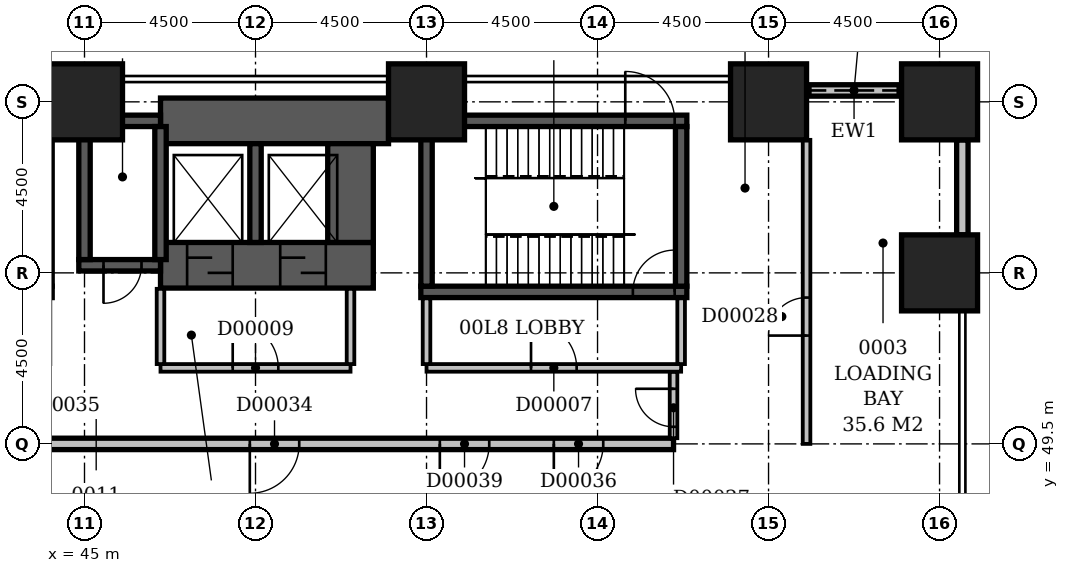
"""IFC4 building model, lengths in metres.
Left out: names, types, materials, properties, quantities, classifications, styles, units other than length and angle.
Written with IfcOpenShell. Run it as: python <this file> out.ifc"""

import sys

from ifc_helpers import new_model, si_unit, direction, frame, frame_2d, origin, origin_2d, place, context, subcontext, project, spatial, rectangle, extrude, element, fill, save


model = new_model("IFC4")
c1 = context("Model", 3, precision=1e-05, world=origin(), true_north=direction((0.0, 1.0)))
c2 = subcontext(c1, "Body", "Model", "MODEL_VIEW")
j1 = project(units=[si_unit("LENGTHUNIT", "METRE"), si_unit("PLANEANGLEUNIT", "RADIAN")], contexts=[c1])
p1 = place(None, origin())
s1 = spatial("IfcSite", under=j1, at=p1, CompositionType="ELEMENT")
p2 = place(p1, origin())
s2 = spatial("IfcBuilding", under=s1, at=p2, CompositionType="ELEMENT")
p3 = place(p2, origin())
s3 = spatial("IfcBuildingStorey", under=s2, at=p3, CompositionType="ELEMENT", Elevation=0.0)
p4 = place(p3, frame((44.0, 53.65, -0.45), z_axis=(0.0, 0.0, 1.0), x_axis=(0.0, 1.0, 0.0)))
e1 = element("IfcWall", 1, at=p4, inside=s3, PredefinedType="SHEAR", context=c2, shape_type="SweptSolid", body=[
    extrude(rectangle(XDim=4.2, YDim=0.3, at=frame_2d((2.1, 0.0))), origin(), (0.0, 0.0, 1.0), 8.85),
])
p5 = place(p3, frame((44.85, 54.2, -0.45), z_axis=(0.0, 0.0, 1.0), x_axis=(1.0, 0.0, 0.0)))
e2 = element("IfcWall", 2, at=p5, inside=s3, PredefinedType="SHEAR", context=c2, shape_type="SweptSolid", body=[
    extrude(rectangle(XDim=2.15, YDim=0.3, at=frame_2d((1.075, 0.0))), origin(), (0.0, 0.0, 1.0), 8.85),
])
p6 = place(p5, frame((0.65, 0.0, 0.45)))
e3 = element("IfcOpeningElement", 3, at=p6, cuts=e2, PredefinedType="OPENING", context=c2, shape_type="SweptSolid", body=[
    extrude(rectangle(XDim=1.0, YDim=2.1, at=frame_2d((0.5, 1.05))), frame((0.0, 0.162, 0.0), z_axis=(0.0, -1.0, 0.0), x_axis=(1.0, 0.0, 0.0)), (0.0, 0.0, 1.0), 0.324),
])
p7 = place(p3, frame((44.85, 58.0, -0.45), z_axis=(0.0, 0.0, 1.0), x_axis=(1.0, 0.0, 0.0)))
e4 = element("IfcWall", 4, at=p7, inside=s3, PredefinedType="SHEAR", context=c2, shape_type="SweptSolid", body=[
    extrude(rectangle(XDim=2.15, YDim=0.3, at=frame_2d((1.075, 0.0))), origin(), (0.0, 0.0, 1.0), 8.85),
])
p8 = place(p3, frame((45.0, 54.35, -0.45), z_axis=(0.0, 0.0, 1.0), x_axis=(0.0, 1.0, 0.0)))
e5 = element("IfcWall", 5, at=p8, inside=s3, PredefinedType="SHEAR", context=c2, shape_type="SweptSolid", body=[
    extrude(rectangle(XDim=3.5, YDim=0.3, at=frame_2d((1.75, 0.0))), origin(), (0.0, 0.0, 1.0), 8.85),
])
p9 = place(p3, frame((47.0, 54.2, -0.45), z_axis=(0.0, 0.0, 1.0), x_axis=(1.0, 0.0, 0.0)))
e6 = element("IfcWall", 6, at=p9, inside=s3, PredefinedType="SHEAR", context=c2, shape_type="SweptSolid", body=[
    extrude(rectangle(XDim=5.6, YDim=1.2, at=frame_2d((2.8, 0.0))), origin(), (0.0, 0.0, 1.0), 8.85),
])
p10 = place(p9, frame((0.7, 0.0, 0.45)))
e7 = element("IfcOpeningElement", 7, at=p10, cuts=e6, PredefinedType="OPENING", context=c2, shape_type="SweptSolid", body=[
    extrude(rectangle(XDim=1.2, YDim=2.1, at=frame_2d((0.6, 1.05))), frame((0.0, 0.612, 0.0), z_axis=(0.0, -1.0, 0.0), x_axis=(1.0, 0.0, 0.0)), (0.0, 0.0, 1.0), 1.224),
])
p11 = place(p9, frame((3.15, 0.0, 0.45)))
e8 = element("IfcOpeningElement", 8, at=p11, cuts=e6, PredefinedType="OPENING", context=c2, shape_type="SweptSolid", body=[
    extrude(rectangle(XDim=1.2, YDim=2.1, at=frame_2d((0.6, 1.05))), frame((0.0, 0.612, 0.0), z_axis=(0.0, -1.0, 0.0), x_axis=(1.0, 0.0, 0.0)), (0.0, 0.0, 1.0), 1.224),
])
p12 = place(p3, frame((47.0, 54.35, -0.45), z_axis=(0.0, 0.0, 1.0), x_axis=(0.0, 1.0, 0.0)))
e9 = element("IfcWall", 9, at=p12, inside=s3, PredefinedType="SHEAR", context=c2, shape_type="SweptSolid", body=[
    extrude(rectangle(XDim=3.5, YDim=0.3, at=frame_2d((1.75, 0.0))), origin(), (0.0, 0.0, 1.0), 8.85),
])
p13 = place(p3, frame((47.0, 58.0, -0.45), z_axis=(0.0, 0.0, 1.0), x_axis=(1.0, 0.0, 0.0)))
e10 = element("IfcWall", 10, at=p13, inside=s3, PredefinedType="SHEAR", context=c2, shape_type="SweptSolid", body=[
    extrude(rectangle(XDim=6.0, YDim=1.2, at=frame_2d((3.0, 0.0))), origin(), (0.0, 0.0, 1.0), 8.85),
])
p14 = place(p3, frame((49.5, 54.8, -0.45), z_axis=(0.0, 0.0, 1.0), x_axis=(0.0, 1.0, 0.0)))
e11 = element("IfcWall", 11, at=p14, inside=s3, PredefinedType="SHEAR", context=c2, shape_type="SweptSolid", body=[
    extrude(rectangle(XDim=2.6, YDim=0.3, at=frame_2d((1.3, 0.0))), origin(), (0.0, 0.0, 1.0), 8.85),
])
p15 = place(p3, frame((52.0, 54.8, -0.45), z_axis=(0.0, 0.0, 1.0), x_axis=(0.0, 1.0, 0.0)))
e12 = element("IfcWall", 12, at=p15, inside=s3, PredefinedType="SHEAR", context=c2, shape_type="SweptSolid", body=[
    extrude(rectangle(XDim=2.6, YDim=1.2, at=frame_2d((1.3, 0.0))), origin(), (0.0, 0.0, 1.0), 8.85),
])
p16 = place(p3, frame((53.85, 53.5, -0.45), z_axis=(0.0, 0.0, 1.0), x_axis=(1.0, 0.0, 0.0)))
e13 = element("IfcWall", 13, at=p16, inside=s3, PredefinedType="SHEAR", context=c2, shape_type="SweptSolid", body=[
    extrude(rectangle(XDim=7.0, YDim=0.3, at=frame_2d((3.5, 0.0))), origin(), (0.0, 0.0, 1.0), 8.85),
])
p17 = place(p16, frame((5.58, 0.0, 0.45)))
e14 = element("IfcOpeningElement", 14, at=p17, cuts=e13, PredefinedType="OPENING", context=c2, shape_type="SweptSolid", body=[
    extrude(rectangle(XDim=1.1, YDim=2.1, at=frame_2d((0.55, 1.05))), frame((0.0, 0.162, 0.0), z_axis=(0.0, -1.0, 0.0), x_axis=(1.0, 0.0, 0.0)), (0.0, 0.0, 1.0), 0.324),
])
p18 = place(p3, frame((53.85, 58.0, -0.45), z_axis=(0.0, 0.0, 1.0), x_axis=(1.0, 0.0, 0.0)))
e15 = element("IfcWall", 15, at=p18, inside=s3, PredefinedType="SHEAR", context=c2, shape_type="SweptSolid", body=[
    extrude(rectangle(XDim=7.0, YDim=0.3, at=frame_2d((3.5, 0.0))), origin(), (0.0, 0.0, 1.0), 8.85),
])
p19 = place(p18, frame((5.38, 0.0, 0.45)))
e16 = element("IfcOpeningElement", 16, at=p19, cuts=e15, PredefinedType="OPENING", context=c2, shape_type="SweptSolid", body=[
    extrude(rectangle(XDim=1.3, YDim=2.4, at=frame_2d((0.65, 1.2))), frame((0.0, 0.162, 0.0), z_axis=(0.0, -1.0, 0.0), x_axis=(1.0, 0.0, 0.0)), (0.0, 0.0, 1.0), 0.324),
])
for number, where, z_axis, x_axis in (
    (17, (54.0, 53.65, -0.45), (0.0, 0.0, 1.0), (0.0, 1.0, 0.0)),
    (18, (60.7, 53.65, -0.45), (0.0, 0.0, 1.0), (0.0, 1.0, 0.0)),
):
    element("IfcWall", number, at=place(p3, frame(where, z_axis=z_axis, x_axis=x_axis)), inside=s3, PredefinedType="SHEAR", context=c2, shape_type="SweptSolid", body=[
        extrude(rectangle(XDim=4.2, YDim=0.3, at=frame_2d((2.1, 0.0))), origin(), (0.0, 0.0, 1.0), 8.85),
    ])
for number, where, z_axis, x_axis in (
    (19, (67.5, 54.0, -0.45), (0.0, 0.0, 1.0), (1.0, 0.0, 0.0)),
    (20, (45.0, 58.5, -0.45), (0.0, 0.0, 1.0), (1.0, 0.0, 0.0)),
    (21, (54.0, 58.5, -0.45), (0.0, 0.0, 1.0), (1.0, 0.0, 0.0)),
    (22, (63.0, 58.5, -0.45), (0.0, 0.0, 1.0), (1.0, 0.0, 0.0)),
    (23, (67.5, 58.5, -0.45), (0.0, 0.0, 1.0), (1.0, 0.0, 0.0)),
):
    element("IfcColumn", number, at=place(p3, frame(where, z_axis=z_axis, x_axis=x_axis)), inside=s3, PredefinedType="COLUMN", context=c2, shape_type="SweptSolid", body=[
        extrude(rectangle(XDim=2.0, YDim=2.0, at=origin_2d()), origin(), (0.0, 0.0, 1.0), 8.85),
    ])
p20 = place(p3, frame((68.1, 55.0, 0.0), z_axis=(0.0, 0.0, 1.0), x_axis=(0.0, 1.0, 0.0)))
e24 = element("IfcWall", 24, at=p20, inside=s3, PredefinedType="STANDARD", context=c2, shape_type="SweptSolid", body=[
    extrude(rectangle(XDim=2.5, YDim=0.3, at=frame_2d((1.25, 0.0))), origin(), (0.0, 0.0, 1.0), 7.2),
])
p21 = place(p3, frame((47.0, 51.5, 0.0), z_axis=(0.0, 0.0, 1.0), x_axis=(1.0, 0.0, 0.0)))
e25 = element("IfcWall", 25, at=p21, inside=s3, PredefinedType="PARTITIONING", context=c2, shape_type="SweptSolid", body=[
    extrude(rectangle(XDim=5.0, YDim=0.2, at=frame_2d((2.5, 0.0))), origin(), (0.0, 0.0, 1.0), 8.4),
])
p22 = place(p21, frame((1.9, 0.0, 0.0)))
e26 = element("IfcOpeningElement", 26, at=p22, cuts=e25, PredefinedType="OPENING", context=c2, shape_type="SweptSolid", body=[
    extrude(rectangle(XDim=1.2, YDim=2.1, at=frame_2d((0.6, 1.05))), frame((0.0, 0.112, 0.0), z_axis=(0.0, -1.0, 0.0), x_axis=(1.0, 0.0, 0.0)), (0.0, 0.0, 1.0), 0.224),
])
for number, where, z_axis, x_axis in (
    (27, (52.0, 51.6, 0.0), (0.0, 0.0, 1.0), (0.0, 1.0, 0.0)),
    (28, (47.0, 51.6, 0.0), (0.0, 0.0, 1.0), (0.0, 1.0, 0.0)),
):
    element("IfcWall", number, at=place(p3, frame(where, z_axis=z_axis, x_axis=x_axis)), inside=s3, PredefinedType="PARTITIONING", context=c2, shape_type="SweptSolid", body=[
        extrude(rectangle(XDim=1.98, YDim=0.2, at=frame_2d((0.99, 0.0))), origin(), (0.0, 0.0, 1.0), 8.4),
    ])
p23 = place(p3, frame((54.0, 51.5, 0.0), z_axis=(0.0, 0.0, 1.0), x_axis=(1.0, 0.0, 0.0)))
e29 = element("IfcWall", 29, at=p23, inside=s3, PredefinedType="PARTITIONING", context=c2, shape_type="SweptSolid", body=[
    extrude(rectangle(XDim=6.7, YDim=0.2, at=frame_2d((3.35, 0.0))), origin(), (0.0, 0.0, 1.0), 8.4),
])
p24 = place(p23, frame((2.75, 0.0, 0.0)))
e30 = element("IfcOpeningElement", 30, at=p24, cuts=e29, PredefinedType="OPENING", context=c2, shape_type="SweptSolid", body=[
    extrude(rectangle(XDim=1.2, YDim=2.1, at=frame_2d((0.6, 1.05))), frame((0.0, 0.112, 0.0), z_axis=(0.0, -1.0, 0.0), x_axis=(1.0, 0.0, 0.0)), (0.0, 0.0, 1.0), 0.224),
])
p25 = place(p3, frame((60.7, 51.6, 0.0), z_axis=(0.0, 0.0, 1.0), x_axis=(0.0, 1.0, 0.0)))
e31 = element("IfcWall", 31, at=p25, inside=s3, PredefinedType="PARTITIONING", context=c2, shape_type="SweptSolid", body=[
    extrude(rectangle(XDim=1.73, YDim=0.2, at=frame_2d((0.865, 0.0))), origin(), (0.0, 0.0, 1.0), 8.4),
])
p26 = place(p3, frame((54.0, 51.6, 0.0), z_axis=(0.0, 0.0, 1.0), x_axis=(0.0, 1.0, 0.0)))
e32 = element("IfcWall", 32, at=p26, inside=s3, PredefinedType="PARTITIONING", context=c2, shape_type="SweptSolid", body=[
    extrude(rectangle(XDim=1.73, YDim=0.2, at=frame_2d((0.865, 0.0))), origin(), (0.0, 0.0, 1.0), 7.7),
])
p27 = place(p3, frame((60.5, 49.65, 0.0), z_axis=(0.0, 0.0, 1.0), x_axis=(0.0, 1.0, 0.0)))
e33 = element("IfcWall", 33, at=p27, inside=s3, PredefinedType="PARTITIONING", context=c2, shape_type="SweptSolid", body=[
    extrude(rectangle(XDim=1.75, YDim=0.2, at=frame_2d((0.875, 0.0))), origin(), (0.0, 0.0, 1.0), 8.4),
])
p28 = place(p27, frame((0.3, 0.0, 0.0)))
e34 = element("IfcOpeningElement", 34, at=p28, cuts=e33, PredefinedType="OPENING", context=c2, shape_type="SweptSolid", body=[
    extrude(rectangle(XDim=1.0, YDim=2.1, at=frame_2d((0.5, 1.05))), frame((0.0, 0.112, 0.0), z_axis=(0.0, -1.0, 0.0), x_axis=(1.0, 0.0, 0.0)), (0.0, 0.0, 1.0), 0.224),
])
p29 = place(p3, frame((64.0, 49.5, 0.0), z_axis=(0.0, 0.0, 1.0), x_axis=(0.0, 1.0, 0.0)))
e35 = element("IfcWall", 35, at=p29, inside=s3, PredefinedType="PARTITIONING", context=c2, shape_type="SweptSolid", body=[
    extrude(rectangle(XDim=8.0, YDim=0.2, at=frame_2d((4.0, 0.0))), origin(), (0.0, 0.0, 1.0), 8.4),
])
p30 = place(p29, frame((2.85, 0.0, 0.0)))
e36 = element("IfcOpeningElement", 36, at=p30, cuts=e35, PredefinedType="OPENING", context=c2, shape_type="SweptSolid", body=[
    extrude(rectangle(XDim=1.0, YDim=2.1, at=frame_2d((0.5, 1.05))), frame((0.0, 0.112, 0.0), z_axis=(0.0, -1.0, 0.0), x_axis=(1.0, 0.0, 0.0)), (0.0, 0.0, 1.0), 0.224),
])
p31 = place(p3, frame((9.0, 49.5, 0.0), z_axis=(0.0, 0.0, 1.0), x_axis=(1.0, 0.0, 0.0)))
e37 = element("IfcWall", 37, at=p31, inside=s3, PredefinedType="SOLIDWALL", context=c2, shape_type="SweptSolid", body=[
    extrude(rectangle(XDim=51.5, YDim=0.3, at=frame_2d((25.75, 0.0))), origin(), (0.0, 0.0, 1.0), 8.4),
])
p32 = place(p31, frame((19.1, 0.0, 0.0)))
e38 = element("IfcOpeningElement", 38, at=p32, cuts=e37, PredefinedType="OPENING", context=c2, shape_type="SweptSolid", body=[
    extrude(rectangle(XDim=1.8, YDim=2.4, at=frame_2d((0.9, 1.2))), frame((0.0, 0.162, 0.0), z_axis=(0.0, -1.0, 0.0), x_axis=(1.0, 0.0, 0.0)), (0.0, 0.0, 1.0), 0.324),
])
p33 = place(p31, frame((22.1, 0.0, 0.0)))
e39 = element("IfcOpeningElement", 39, at=p33, cuts=e37, PredefinedType="OPENING", context=c2, shape_type="SweptSolid", body=[
    extrude(rectangle(XDim=1.8, YDim=2.4, at=frame_2d((0.9, 1.2))), frame((0.0, 0.162, 0.0), z_axis=(0.0, -1.0, 0.0), x_axis=(1.0, 0.0, 0.0)), (0.0, 0.0, 1.0), 0.324),
])
p34 = place(p31, frame((25.1, 0.0, 0.0)))
e40 = element("IfcOpeningElement", 40, at=p34, cuts=e37, PredefinedType="OPENING", context=c2, shape_type="SweptSolid", body=[
    extrude(rectangle(XDim=1.8, YDim=2.4, at=frame_2d((0.9, 1.2))), frame((0.0, 0.162, 0.0), z_axis=(0.0, -1.0, 0.0), x_axis=(1.0, 0.0, 0.0)), (0.0, 0.0, 1.0), 0.324),
])
p35 = place(p31, frame((40.35, 0.0, 0.0)))
e41 = element("IfcOpeningElement", 41, at=p35, cuts=e37, PredefinedType="OPENING", context=c2, shape_type="SweptSolid", body=[
    extrude(rectangle(XDim=1.3, YDim=2.4, at=frame_2d((0.65, 1.2))), frame((0.0, 0.162, 0.0), z_axis=(0.0, -1.0, 0.0), x_axis=(1.0, 0.0, 0.0)), (0.0, 0.0, 1.0), 0.324),
])
p36 = place(p31, frame((32.35, 0.0, 0.0)))
e42 = element("IfcOpeningElement", 42, at=p36, cuts=e37, PredefinedType="OPENING", context=c2, shape_type="SweptSolid", body=[
    extrude(rectangle(XDim=1.3, YDim=2.4, at=frame_2d((0.65, 1.2))), frame((0.0, 0.162, 0.0), z_axis=(0.0, -1.0, 0.0), x_axis=(1.0, 0.0, 0.0)), (0.0, 0.0, 1.0), 0.324),
])
p37 = place(p31, frame((48.35, 0.0, 0.0)))
e43 = element("IfcOpeningElement", 43, at=p37, cuts=e37, PredefinedType="OPENING", context=c2, shape_type="SweptSolid", body=[
    extrude(rectangle(XDim=1.3, YDim=2.4, at=frame_2d((0.65, 1.2))), frame((0.0, 0.162, 0.0), z_axis=(0.0, -1.0, 0.0), x_axis=(1.0, 0.0, 0.0)), (0.0, 0.0, 1.0), 0.324),
])
p38 = place(p31, frame((1.35, 0.0, 0.0)))
e44 = element("IfcOpeningElement", 44, at=p38, cuts=e37, PredefinedType="OPENING", context=c2, shape_type="SweptSolid", body=[
    extrude(rectangle(XDim=1.3, YDim=2.4, at=frame_2d((0.65, 1.2))), frame((0.0, 0.162, 0.0), z_axis=(0.0, -1.0, 0.0), x_axis=(1.0, 0.0, 0.0)), (0.0, 0.0, 1.0), 0.324),
])
p39 = place(p31, frame((7.35, 0.0, 0.0)))
e45 = element("IfcOpeningElement", 45, at=p39, cuts=e37, PredefinedType="OPENING", context=c2, shape_type="SweptSolid", body=[
    extrude(rectangle(XDim=1.3, YDim=2.4, at=frame_2d((0.65, 1.2))), frame((0.0, 0.162, 0.0), z_axis=(0.0, -1.0, 0.0), x_axis=(1.0, 0.0, 0.0)), (0.0, 0.0, 1.0), 0.324),
])
p40 = place(p31, frame((45.35, 0.0, 0.0)))
e46 = element("IfcOpeningElement", 46, at=p40, cuts=e37, PredefinedType="OPENING", context=c2, shape_type="SweptSolid", body=[
    extrude(rectangle(XDim=1.3, YDim=2.4, at=frame_2d((0.65, 1.2))), frame((0.0, 0.162, 0.0), z_axis=(0.0, -1.0, 0.0), x_axis=(1.0, 0.0, 0.0)), (0.0, 0.0, 1.0), 0.324),
])
p41 = place(p3, frame((64.0, 58.8, 0.0), z_axis=(0.0, 0.0, 1.0), x_axis=(1.0, 0.0, 0.0)))
e47 = element("IfcWall", 47, at=p41, inside=s3, PredefinedType="SOLIDWALL", context=c2, shape_type="SweptSolid", body=[
    extrude(rectangle(XDim=2.5, YDim=0.3, at=frame_2d((1.25, 0.0))), origin(), (0.0, 0.0, 1.0), 7.9),
])
p42 = place(p41, frame((0.1, 0.0, 0.0)))
e48 = element("IfcOpeningElement", 48, at=p42, cuts=e47, PredefinedType="OPENING", context=c2, shape_type="SweptSolid", body=[
    extrude(rectangle(XDim=2.3, YDim=3.0, at=frame_2d((1.15, 1.5))), frame((0.0, 0.162, 0.0), z_axis=(0.0, -1.0, 0.0), x_axis=(1.0, 0.0, 0.0)), (0.0, 0.0, 1.0), 0.324),
])
p43 = place(p24, origin())
e49 = element("IfcDoor", 49, at=p43, inside=s3, OperationType="SINGLE_SWING_LEFT", PredefinedType="DOOR", context=c2, shape_type="SweptSolid", body=[
    extrude(rectangle(XDim=1.2, YDim=2.1, at=frame_2d((0.6, 1.05))), frame((0.0, 0.025, 0.0), z_axis=(0.0, -1.0, 0.0), x_axis=(1.0, 0.0, 0.0)), (0.0, 0.0, 1.0), 0.05),
])
fill(e30, e49)
p44 = place(p10, origin())
e50 = element("IfcDoor", 50, at=p44, inside=s3, OperationType="SLIDING_TO_LEFT", PredefinedType="DOOR", context=c2, shape_type="SweptSolid", body=[
    extrude(rectangle(XDim=1.2, YDim=2.1, at=frame_2d((0.6, 1.05))), frame((0.0, 0.025, 0.0), z_axis=(0.0, -1.0, 0.0), x_axis=(1.0, 0.0, 0.0)), (0.0, 0.0, 1.0), 0.05),
])
fill(e7, e50)
p45 = place(p11, origin())
e51 = element("IfcDoor", 51, at=p45, inside=s3, OperationType="SLIDING_TO_LEFT", PredefinedType="DOOR", context=c2, shape_type="SweptSolid", body=[
    extrude(rectangle(XDim=1.2, YDim=2.1, at=frame_2d((0.6, 1.05))), frame((0.0, 0.025, 0.0), z_axis=(0.0, -1.0, 0.0), x_axis=(1.0, 0.0, 0.0)), (0.0, 0.0, 1.0), 0.05),
])
fill(e8, e51)
p46 = place(p22, origin())
e52 = element("IfcDoor", 52, at=p46, inside=s3, OperationType="SINGLE_SWING_LEFT", PredefinedType="DOOR", context=c2, shape_type="SweptSolid", body=[
    extrude(rectangle(XDim=1.2, YDim=2.1, at=frame_2d((0.6, 1.05))), frame((0.0, 0.025, 0.0), z_axis=(0.0, -1.0, 0.0), x_axis=(1.0, 0.0, 0.0)), (0.0, 0.0, 1.0), 0.05),
])
fill(e26, e52)
p47 = place(p6, frame((1.0, 0.0, 0.0), z_axis=(0.0, 0.0, 1.0), x_axis=(-1.0, 0.0, 0.0)))
e53 = element("IfcDoor", 53, at=p47, inside=s3, OperationType="SINGLE_SWING_RIGHT", PredefinedType="DOOR", context=c2, shape_type="SweptSolid", body=[
    extrude(rectangle(XDim=1.0, YDim=2.1, at=frame_2d((0.5, 1.05))), frame((0.0, 0.025, 0.0), z_axis=(0.0, -1.0, 0.0), x_axis=(1.0, 0.0, 0.0)), (0.0, 0.0, 1.0), 0.05),
])
fill(e3, e53)
p48 = place(p17, frame((1.1, 0.0, 0.0), z_axis=(0.0, 0.0, 1.0), x_axis=(-1.0, 0.0, 0.0)))
e54 = element("IfcDoor", 54, at=p48, inside=s3, OperationType="SINGLE_SWING_LEFT", PredefinedType="DOOR", context=c2, shape_type="SweptSolid", body=[
    extrude(rectangle(XDim=1.1, YDim=2.1, at=frame_2d((0.55, 1.05))), frame((0.0, 0.025, 0.0), z_axis=(0.0, -1.0, 0.0), x_axis=(1.0, 0.0, 0.0)), (0.0, 0.0, 1.0), 0.05),
])
fill(e14, e54)
p49 = place(p19, origin())
e55 = element("IfcDoor", 55, at=p49, inside=s3, OperationType="SINGLE_SWING_LEFT", PredefinedType="DOOR", context=c2, shape_type="SweptSolid", body=[
    extrude(rectangle(XDim=1.3, YDim=2.4, at=frame_2d((0.65, 1.2))), frame((0.0, 0.025, 0.0), z_axis=(0.0, -1.0, 0.0), x_axis=(1.0, 0.0, 0.0)), (0.0, 0.0, 1.0), 0.05),
])
fill(e16, e55)
p50 = place(p28, frame((1.0, 0.0, 0.0), z_axis=(0.0, 0.0, 1.0), x_axis=(-1.0, 0.0, 0.0)))
e56 = element("IfcDoor", 56, at=p50, inside=s3, OperationType="SINGLE_SWING_LEFT", PredefinedType="DOOR", context=c2, shape_type="SweptSolid", body=[
    extrude(rectangle(XDim=1.0, YDim=2.1, at=frame_2d((0.5, 1.05))), frame((0.0, 0.025, 0.0), z_axis=(0.0, -1.0, 0.0), x_axis=(1.0, 0.0, 0.0)), (0.0, 0.0, 1.0), 0.05),
])
fill(e34, e56)
p51 = place(p30, origin())
e57 = element("IfcDoor", 57, at=p51, inside=s3, OperationType="SINGLE_SWING_LEFT", PredefinedType="DOOR", context=c2, shape_type="SweptSolid", body=[
    extrude(rectangle(XDim=1.0, YDim=2.1, at=frame_2d((0.5, 1.05))), frame((0.0, 0.025, 0.0), z_axis=(0.0, -1.0, 0.0), x_axis=(1.0, 0.0, 0.0)), (0.0, 0.0, 1.0), 0.05),
])
fill(e36, e57)
p52 = place(p35, frame((1.3, 0.0, 0.0), z_axis=(0.0, 0.0, 1.0), x_axis=(-1.0, 0.0, 0.0)))
e58 = element("IfcDoor", 58, at=p52, inside=s3, OperationType="SINGLE_SWING_RIGHT", PredefinedType="DOOR", context=c2, shape_type="SweptSolid", body=[
    extrude(rectangle(XDim=1.3, YDim=2.4, at=frame_2d((0.65, 1.2))), frame((0.0, 0.025, 0.0), z_axis=(0.0, -1.0, 0.0), x_axis=(1.0, 0.0, 0.0)), (0.0, 0.0, 1.0), 0.05),
])
fill(e41, e58)
p53 = place(p37, frame((1.3, 0.0, 0.0), z_axis=(0.0, 0.0, 1.0), x_axis=(-1.0, 0.0, 0.0)))
e59 = element("IfcDoor", 59, at=p53, inside=s3, OperationType="SINGLE_SWING_RIGHT", PredefinedType="DOOR", context=c2, shape_type="SweptSolid", body=[
    extrude(rectangle(XDim=1.3, YDim=2.4, at=frame_2d((0.65, 1.2))), frame((0.0, 0.025, 0.0), z_axis=(0.0, -1.0, 0.0), x_axis=(1.0, 0.0, 0.0)), (0.0, 0.0, 1.0), 0.05),
])
fill(e43, e59)
p54 = place(p40, frame((1.3, 0.0, 0.0), z_axis=(0.0, 0.0, 1.0), x_axis=(-1.0, 0.0, 0.0)))
e60 = element("IfcDoor", 60, at=p54, inside=s3, OperationType="SINGLE_SWING_RIGHT", PredefinedType="DOOR", context=c2, shape_type="SweptSolid", body=[
    extrude(rectangle(XDim=1.3, YDim=2.4, at=frame_2d((0.65, 1.2))), frame((0.0, 0.025, 0.0), z_axis=(0.0, -1.0, 0.0), x_axis=(1.0, 0.0, 0.0)), (0.0, 0.0, 1.0), 0.05),
])
fill(e46, e60)
p55 = place(p42, origin())
e61 = element("IfcDoor", 61, at=p55, inside=s3, OperationType="ROLLINGUP", PredefinedType="DOOR", context=c2, shape_type="SweptSolid", body=[
    extrude(rectangle(XDim=2.3, YDim=3.0, at=frame_2d((1.15, 1.5))), frame((0.0, 0.025, 0.0), z_axis=(0.0, -1.0, 0.0), x_axis=(1.0, 0.0, 0.0)), (0.0, 0.0, 1.0), 0.05),
])
fill(e48, e61)
save(model, sys.argv[1])
